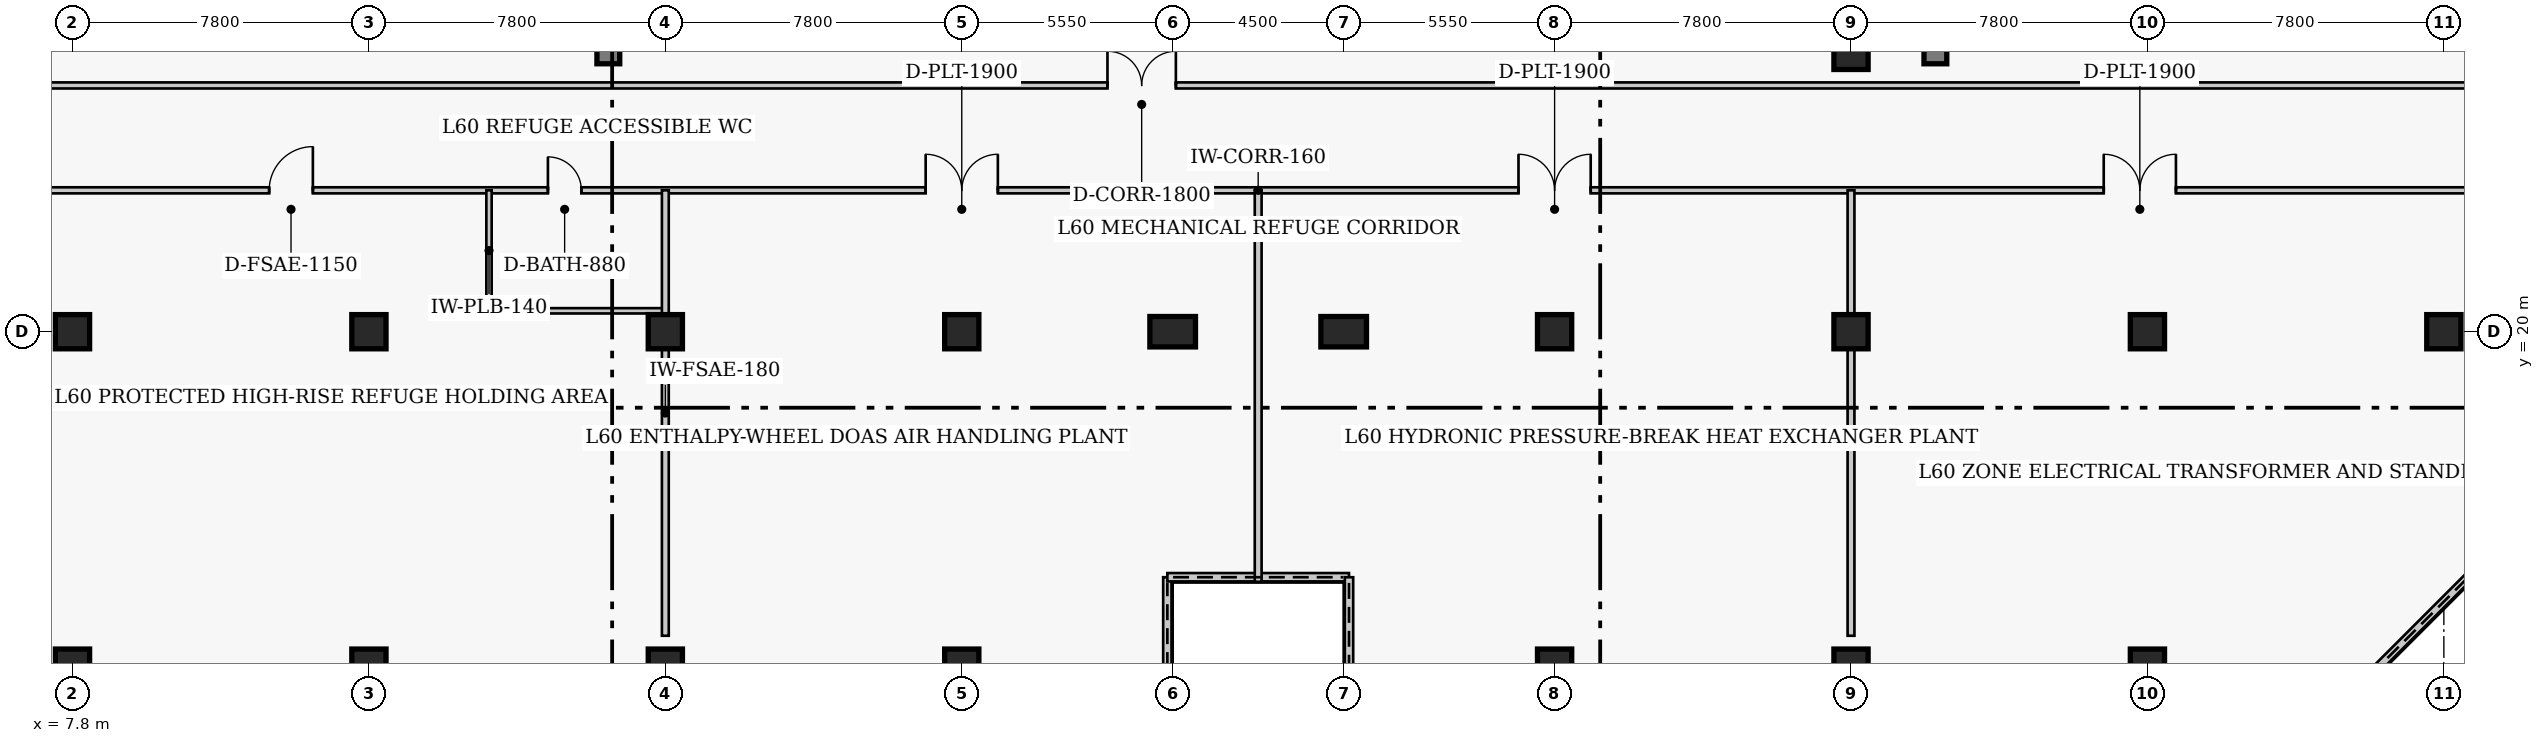
"""IFC4 building model, lengths in metres.
Left out: names, types, materials, properties, quantities, classifications, styles, units other than length and angle.
Written with IfcOpenShell. Run it as: python <this file> out.ifc"""

import sys

from ifc_helpers import new_model, si_unit, direction, frame, frame_2d, origin, origin_2d, place, context, subcontext, project, spatial, rectangle, extrude, element, fill, save


model = new_model("IFC4")
c1 = context("Model", 3, precision=1e-05, world=origin(), true_north=direction((0.0, 1.0)))
c2 = subcontext(c1, "Body", "Model", "MODEL_VIEW")
j1 = project(units=[si_unit("LENGTHUNIT", "METRE"), si_unit("PLANEANGLEUNIT", "RADIAN")], contexts=[c1])
p1 = place(None, origin())
s1 = spatial("IfcSite", under=j1, at=p1, CompositionType="ELEMENT")
p2 = place(p1, origin())
s2 = spatial("IfcBuilding", under=s1, at=p2, CompositionType="ELEMENT")
p3 = place(p2, frame((0.0, 0.0, 240.4)))
s3 = spatial("IfcBuildingStorey", under=s2, at=p3, CompositionType="ELEMENT", Elevation=240.4)
for number, where, z_axis, x_axis in (
    (1, (21.9, 27.05, 0.0), (0.0, 0.0, 1.0), (0.0, 1.0, 0.0)),
    (2, (56.82, 27.05, 0.0), (0.0, 0.0, 1.0), (0.0, 1.0, 0.0)),
):
    element("IfcWall", number, at=place(p3, frame(where, z_axis=z_axis, x_axis=x_axis)), inside=s3, PredefinedType="SHEAR", context=c2, shape_type="SweptSolid", body=[
        extrude(rectangle(XDim=13.57, YDim=0.6, at=frame_2d((6.785, 0.0))), origin(), (0.0, 0.0, 1.0), 5.0),
    ])
for number, where, z_axis, x_axis in (
    (3, (7.8, 11.2, 0.0), (0.0, 0.0, 1.0), (1.0, 0.0, 0.0)),
    (4, (7.8, 20.0, 0.0), (0.0, 0.0, 1.0), (1.0, 0.0, 0.0)),
    (5, (15.6, 11.2, 0.0), (0.0, 0.0, 1.0), (1.0, 0.0, 0.0)),
    (6, (15.6, 20.0, 0.0), (0.0, 0.0, 1.0), (1.0, 0.0, 0.0)),
    (7, (23.4, 11.2, 0.0), (0.0, 0.0, 1.0), (1.0, 0.0, 0.0)),
    (8, (23.4, 20.0, 0.0), (0.0, 0.0, 1.0), (1.0, 0.0, 0.0)),
    (9, (31.2, 11.2, 0.0), (0.0, 0.0, 1.0), (1.0, 0.0, 0.0)),
    (10, (31.2, 20.0, 0.0), (0.0, 0.0, 1.0), (1.0, 0.0, 0.0)),
):
    element("IfcColumn", number, at=place(p3, frame(where, z_axis=z_axis, x_axis=x_axis)), inside=s3, PredefinedType="COLUMN", context=c2, shape_type="SweptSolid", body=[
        extrude(rectangle(XDim=0.9, YDim=0.9, at=origin_2d()), origin(), (0.0, 0.0, 1.0), 5.0),
    ])
for number, where, z_axis, x_axis in (
    (11, (36.75, 20.0, 0.0), (0.0, 0.0, 1.0), (1.0, 0.0, 0.0)),
    (12, (41.25, 20.0, 0.0), (0.0, 0.0, 1.0), (1.0, 0.0, 0.0)),
):
    element("IfcColumn", number, at=place(p3, frame(where, z_axis=z_axis, x_axis=x_axis)), inside=s3, PredefinedType="COLUMN", context=c2, shape_type="SweptSolid", body=[
        extrude(rectangle(XDim=1.2, YDim=0.8, at=origin_2d()), origin(), (0.0, 0.0, 1.0), 5.0),
    ])
for number, where, z_axis, x_axis in (
    (13, (46.8, 11.2, 0.0), (0.0, 0.0, 1.0), (1.0, 0.0, 0.0)),
    (14, (46.8, 20.0, 0.0), (0.0, 0.0, 1.0), (1.0, 0.0, 0.0)),
    (15, (54.6, 11.2, 0.0), (0.0, 0.0, 1.0), (1.0, 0.0, 0.0)),
    (16, (54.6, 20.0, 0.0), (0.0, 0.0, 1.0), (1.0, 0.0, 0.0)),
    (17, (62.4, 11.2, 0.0), (0.0, 0.0, 1.0), (1.0, 0.0, 0.0)),
    (18, (62.4, 20.0, 0.0), (0.0, 0.0, 1.0), (1.0, 0.0, 0.0)),
    (19, (70.2, 20.0, 0.0), (0.0, 0.0, 1.0), (1.0, 0.0, 0.0)),
    (20, (54.6, 27.35, 0.0), (0.0, 0.0, 1.0), (1.0, 0.0, 0.0)),
):
    element("IfcColumn", number, at=place(p3, frame(where, z_axis=z_axis, x_axis=x_axis)), inside=s3, PredefinedType="COLUMN", context=c2, shape_type="SweptSolid", body=[
        extrude(rectangle(XDim=0.9, YDim=0.9, at=origin_2d()), origin(), (0.0, 0.0, 1.0), 5.0),
    ])
p4 = place(p3, frame((36.61, 5.96, 0.0), z_axis=(0.0, 0.0, 1.0), x_axis=(0.0, 1.0, 0.0)))
e21 = element("IfcWall", 21, at=p4, inside=s3, PredefinedType="PARAPET", context=c2, shape_type="SweptSolid", body=[
    extrude(rectangle(XDim=7.58, YDim=0.22, at=frame_2d((3.79, 0.0))), origin(), (0.0, 0.0, 1.0), 1.15),
])
p5 = place(p3, frame((36.61, 13.54, 0.0), z_axis=(0.0, 0.0, 1.0), x_axis=(1.0, 0.0, 0.0)))
e22 = element("IfcWall", 22, at=p5, inside=s3, PredefinedType="PARAPET", context=c2, shape_type="SweptSolid", body=[
    extrude(rectangle(XDim=4.78, YDim=0.22, at=frame_2d((2.39, 0.0))), origin(), (0.0, 0.0, 1.0), 1.15),
])
p6 = place(p3, frame((41.39, 13.54, 0.0), z_axis=(0.0, 0.0, 1.0), x_axis=(0.0, -1.0, 0.0)))
e23 = element("IfcWall", 23, at=p6, inside=s3, PredefinedType="PARAPET", context=c2, shape_type="SweptSolid", body=[
    extrude(rectangle(XDim=3.18, YDim=0.22, at=frame_2d((1.59, 0.0))), origin(), (0.0, 0.0, 1.0), 1.15),
])
p7 = place(p3, frame((67.273, 9.971, 0.0), z_axis=(0.0, 0.0, 1.0), x_axis=(0.707106781187, 0.707106781187, 0.0)))
e24 = element("IfcWall", 24, at=p7, inside=s3, PredefinedType="PARAPET", context=c2, shape_type="SweptSolid", body=[
    extrude(rectangle(XDim=6.02, YDim=0.22, at=frame_2d((3.01, 0.0))), origin(), (0.0, 0.0, 1.0), 1.15),
])
p8 = place(p3, frame((7.0, 23.72, 0.0), z_axis=(0.0, 0.0, 1.0), x_axis=(1.0, 0.0, 0.0)))
e25 = element("IfcWall", 25, at=p8, inside=s3, PredefinedType="PARTITIONING", context=c2, shape_type="SweptSolid", body=[
    extrude(rectangle(XDim=64.0, YDim=0.16, at=frame_2d((32.0, 0.0))), origin(), (0.0, 0.0, 1.0), 4.76),
])
p9 = place(p8, frame((13.31, 0.0, 0.0)))
e26 = element("IfcOpeningElement", 26, at=p9, cuts=e25, PredefinedType="OPENING", context=c2, shape_type="SweptSolid", body=[
    extrude(rectangle(XDim=0.88, YDim=2.05, at=frame_2d((0.44, 1.025))), frame((0.0, 0.09, 0.0), z_axis=(0.0, -1.0, 0.0), x_axis=(1.0, 0.0, 0.0)), (0.0, 0.0, 1.0), 0.18),
])
p10 = place(p8, frame((5.975, 0.0, 0.0)))
e27 = element("IfcOpeningElement", 27, at=p10, cuts=e25, PredefinedType="OPENING", context=c2, shape_type="SweptSolid", body=[
    extrude(rectangle(XDim=1.15, YDim=2.15, at=frame_2d((0.575, 1.075))), frame((0.0, 0.09, 0.0), z_axis=(0.0, -1.0, 0.0), x_axis=(1.0, 0.0, 0.0)), (0.0, 0.0, 1.0), 0.18),
])
p11 = place(p8, frame((23.25, 0.0, 0.0)))
e28 = element("IfcOpeningElement", 28, at=p11, cuts=e25, PredefinedType="OPENING", context=c2, shape_type="SweptSolid", body=[
    extrude(rectangle(XDim=1.9, YDim=2.25, at=frame_2d((0.95, 1.125))), frame((0.0, 0.09, 0.0), z_axis=(0.0, -1.0, 0.0), x_axis=(1.0, 0.0, 0.0)), (0.0, 0.0, 1.0), 0.18),
])
p12 = place(p8, frame((38.85, 0.0, 0.0)))
e29 = element("IfcOpeningElement", 29, at=p12, cuts=e25, PredefinedType="OPENING", context=c2, shape_type="SweptSolid", body=[
    extrude(rectangle(XDim=1.9, YDim=2.25, at=frame_2d((0.95, 1.125))), frame((0.0, 0.09, 0.0), z_axis=(0.0, -1.0, 0.0), x_axis=(1.0, 0.0, 0.0)), (0.0, 0.0, 1.0), 0.18),
])
p13 = place(p8, frame((54.25, 0.0, 0.0)))
e30 = element("IfcOpeningElement", 30, at=p13, cuts=e25, PredefinedType="OPENING", context=c2, shape_type="SweptSolid", body=[
    extrude(rectangle(XDim=1.9, YDim=2.25, at=frame_2d((0.95, 1.125))), frame((0.0, 0.09, 0.0), z_axis=(0.0, -1.0, 0.0), x_axis=(1.0, 0.0, 0.0)), (0.0, 0.0, 1.0), 0.18),
])
p14 = place(p3, frame((7.0, 26.48, 0.0), z_axis=(0.0, 0.0, 1.0), x_axis=(1.0, 0.0, 0.0)))
e31 = element("IfcWall", 31, at=p14, inside=s3, PredefinedType="PARTITIONING", context=c2, shape_type="SweptSolid", body=[
    extrude(rectangle(XDim=64.0, YDim=0.16, at=frame_2d((32.0, 0.0))), origin(), (0.0, 0.0, 1.0), 4.76),
])
p15 = place(p14, frame((28.034, 0.0, 0.0)))
e32 = element("IfcOpeningElement", 32, at=p15, cuts=e31, PredefinedType="OPENING", context=c2, shape_type="SweptSolid", body=[
    extrude(rectangle(XDim=1.8, YDim=2.2, at=frame_2d((0.9, 1.1))), frame((0.0, 0.09, 0.0), z_axis=(0.0, -1.0, 0.0), x_axis=(1.0, 0.0, 0.0)), (0.0, 0.0, 1.0), 0.18),
])
p16 = place(p3, frame((18.76, 20.55, 0.0), z_axis=(0.0, 0.0, 1.0), x_axis=(0.0, 1.0, 0.0)))
e33 = element("IfcWall", 33, at=p16, inside=s3, PredefinedType="PLUMBINGWALL", context=c2, shape_type="SweptSolid", body=[
    extrude(rectangle(XDim=3.17, YDim=0.14, at=frame_2d((1.585, 0.0))), origin(), (0.0, 0.0, 1.0), 4.76),
])
p17 = place(p3, frame((18.76, 20.55, 0.0), z_axis=(0.0, 0.0, 1.0), x_axis=(1.0, 0.0, 0.0)))
e34 = element("IfcWall", 34, at=p17, inside=s3, PredefinedType="PLUMBINGWALL", context=c2, shape_type="SweptSolid", body=[
    extrude(rectangle(XDim=4.64, YDim=0.14, at=frame_2d((2.32, 0.0))), origin(), (0.0, 0.0, 1.0), 4.76),
])
p18 = place(p3, frame((23.4, 12.0, 0.0), z_axis=(0.0, 0.0, 1.0), x_axis=(0.0, 1.0, 0.0)))
e35 = element("IfcWall", 35, at=p18, inside=s3, PredefinedType="PARTITIONING", context=c2, shape_type="SweptSolid", body=[
    extrude(rectangle(XDim=11.72, YDim=0.18, at=frame_2d((5.86, 0.0))), origin(), (0.0, 0.0, 1.0), 3.938),
])
p19 = place(p3, frame((39.0, 13.42, 0.0), z_axis=(0.0, 0.0, 1.0), x_axis=(0.0, 1.0, 0.0)))
e36 = element("IfcWall", 36, at=p19, inside=s3, PredefinedType="PARTITIONING", context=c2, shape_type="SweptSolid", body=[
    extrude(rectangle(XDim=10.3, YDim=0.18, at=frame_2d((5.15, 0.0))), origin(), (0.0, 0.0, 1.0), 4.76),
])
p20 = place(p3, frame((54.6, 12.0, 0.0), z_axis=(0.0, 0.0, 1.0), x_axis=(0.0, 1.0, 0.0)))
e37 = element("IfcWall", 37, at=p20, inside=s3, PredefinedType="PARTITIONING", context=c2, shape_type="SweptSolid", body=[
    extrude(rectangle(XDim=11.72, YDim=0.18, at=frame_2d((5.86, 0.0))), origin(), (0.0, 0.0, 1.0), 3.938),
])
p21 = place(p15, origin())
e38 = element("IfcDoor", 38, at=p21, inside=s3, OperationType="DOUBLE_DOOR_SINGLE_SWING", PredefinedType="DOOR", context=c2, shape_type="SweptSolid", body=[
    extrude(rectangle(XDim=1.8, YDim=2.2, at=frame_2d((0.9, 1.1))), frame((0.0, 0.025, 0.0), z_axis=(0.0, -1.0, 0.0), x_axis=(1.0, 0.0, 0.0)), (0.0, 0.0, 1.0), 0.05),
])
fill(e32, e38)
p22 = place(p9, origin())
e39 = element("IfcDoor", 39, at=p22, inside=s3, OperationType="SINGLE_SWING_LEFT", PredefinedType="DOOR", context=c2, shape_type="SweptSolid", body=[
    extrude(rectangle(XDim=0.88, YDim=2.05, at=frame_2d((0.44, 1.025))), frame((0.0, 0.025, 0.0), z_axis=(0.0, -1.0, 0.0), x_axis=(1.0, 0.0, 0.0)), (0.0, 0.0, 1.0), 0.05),
])
fill(e26, e39)
p23 = place(p10, origin())
e40 = element("IfcDoor", 40, at=p23, inside=s3, OperationType="SINGLE_SWING_RIGHT", PredefinedType="DOOR", context=c2, shape_type="SweptSolid", body=[
    extrude(rectangle(XDim=1.15, YDim=2.15, at=frame_2d((0.575, 1.075))), frame((0.0, 0.025, 0.0), z_axis=(0.0, -1.0, 0.0), x_axis=(1.0, 0.0, 0.0)), (0.0, 0.0, 1.0), 0.05),
])
fill(e27, e40)
p24 = place(p11, origin())
e41 = element("IfcDoor", 41, at=p24, inside=s3, OperationType="DOUBLE_DOOR_SINGLE_SWING", PredefinedType="DOOR", context=c2, shape_type="SweptSolid", body=[
    extrude(rectangle(XDim=1.9, YDim=2.25, at=frame_2d((0.95, 1.125))), frame((0.0, 0.025, 0.0), z_axis=(0.0, -1.0, 0.0), x_axis=(1.0, 0.0, 0.0)), (0.0, 0.0, 1.0), 0.05),
])
fill(e28, e41)
p25 = place(p12, origin())
e42 = element("IfcDoor", 42, at=p25, inside=s3, OperationType="DOUBLE_DOOR_SINGLE_SWING", PredefinedType="DOOR", context=c2, shape_type="SweptSolid", body=[
    extrude(rectangle(XDim=1.9, YDim=2.25, at=frame_2d((0.95, 1.125))), frame((0.0, 0.025, 0.0), z_axis=(0.0, -1.0, 0.0), x_axis=(1.0, 0.0, 0.0)), (0.0, 0.0, 1.0), 0.05),
])
fill(e29, e42)
p26 = place(p13, origin())
e43 = element("IfcDoor", 43, at=p26, inside=s3, OperationType="DOUBLE_DOOR_SINGLE_SWING", PredefinedType="DOOR", context=c2, shape_type="SweptSolid", body=[
    extrude(rectangle(XDim=1.9, YDim=2.25, at=frame_2d((0.95, 1.125))), frame((0.0, 0.025, 0.0), z_axis=(0.0, -1.0, 0.0), x_axis=(1.0, 0.0, 0.0)), (0.0, 0.0, 1.0), 0.05),
])
fill(e30, e43)
save(model, sys.argv[1])
